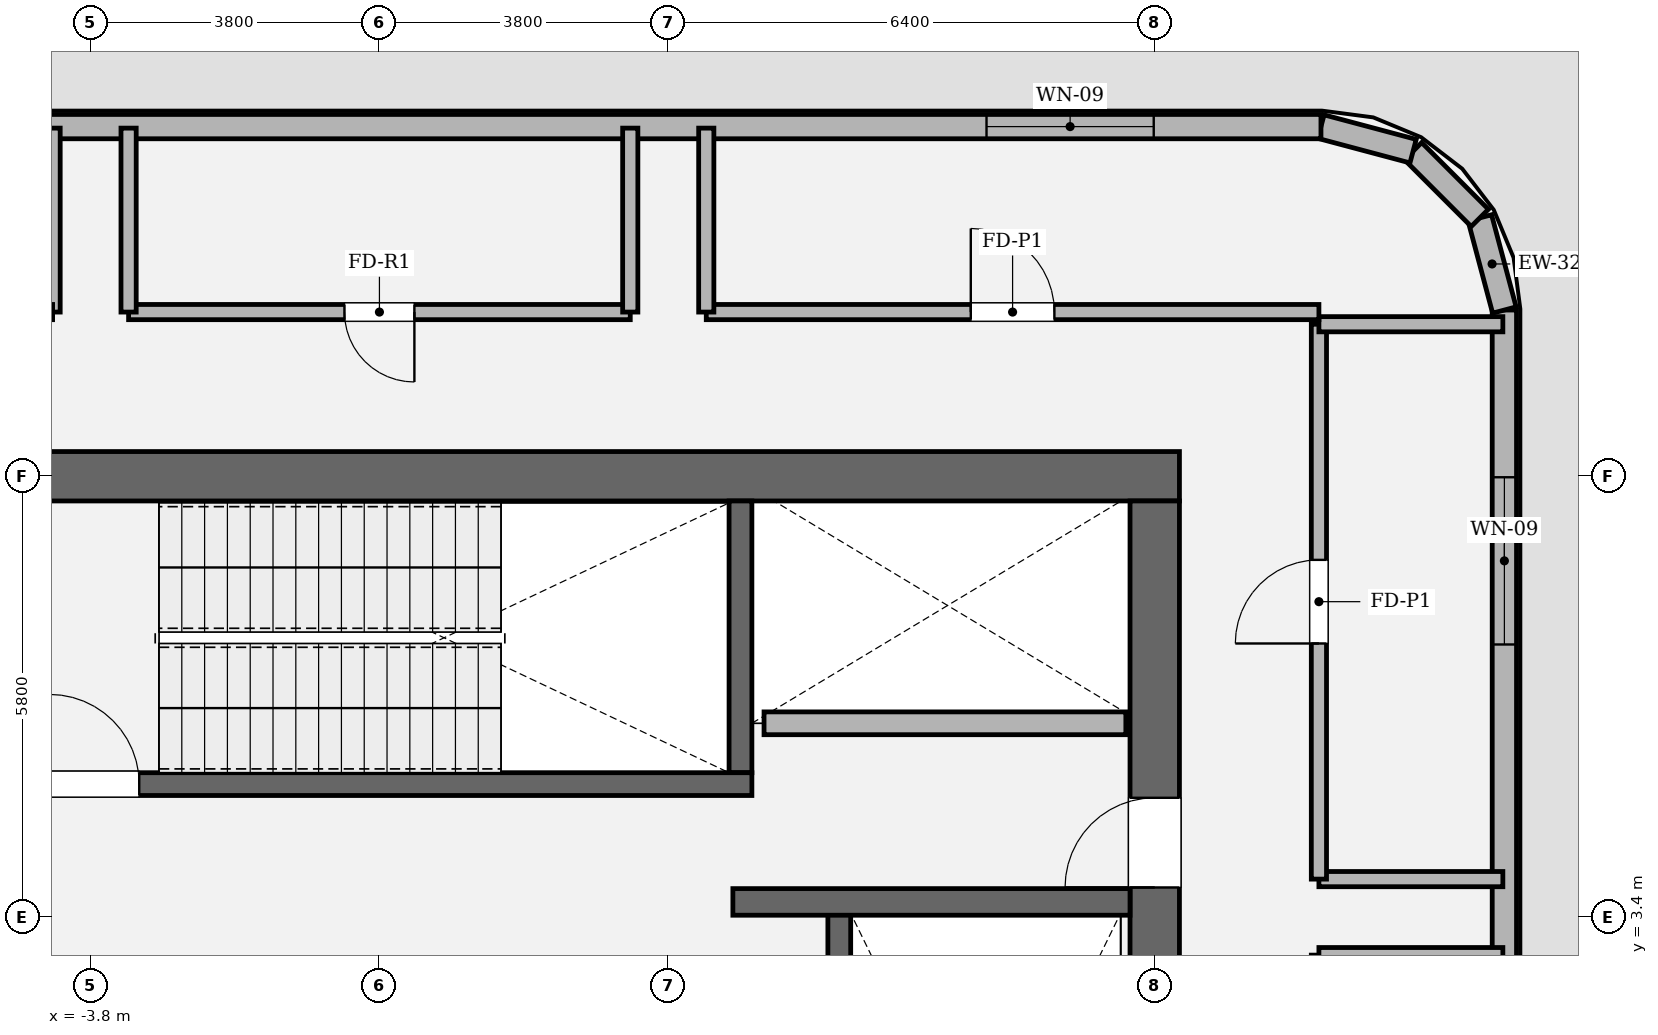
"""IFC4 building model, lengths in metres.
Left out: names, types, materials, properties, quantities, classifications, styles, units other than length and angle.
Written with IfcOpenShell. Run it as: python <this file> out.ifc"""

import sys

from ifc_helpers import new_model, si_unit, direction, frame, frame_2d, origin, place, context, subcontext, project, spatial, rectangle, extrude, element, fill, save


model = new_model("IFC4")
c1 = context("Model", 3, precision=1e-05, world=origin(), true_north=direction((0.0, 1.0)))
c2 = subcontext(c1, "Body", "Model", "MODEL_VIEW")
j1 = project(units=[si_unit("LENGTHUNIT", "METRE"), si_unit("PLANEANGLEUNIT", "RADIAN")], contexts=[c1])
p1 = place(None, origin())
s1 = spatial("IfcSite", under=j1, at=p1, CompositionType="ELEMENT")
p2 = place(p1, origin())
s2 = spatial("IfcBuilding", under=s1, at=p2, CompositionType="ELEMENT")
p3 = place(p2, frame((0.0, 0.0, 125.4)))
s3 = spatial("IfcBuildingStorey", under=s2, at=p3, CompositionType="ELEMENT", Elevation=125.4)
p4 = place(p3, frame((-10.525, 9.2, 0.0), z_axis=(0.0, 0.0, 1.0), x_axis=(1.0, 0.0, 0.0)))
e1 = element("IfcWall", 1, at=p4, inside=s3, PredefinedType="SHEAR", context=c2, shape_type="SweptSolid", body=[
    extrude(rectangle(XDim=21.05, YDim=0.65, at=frame_2d((10.525, 0.0))), origin(), (0.0, 0.0, 1.0), 4.8),
])
p5 = place(p3, frame((10.2, 8.875, 0.0), z_axis=(0.0, 0.0, 1.0), x_axis=(0.0, -1.0, 0.0)))
e2 = element("IfcWall", 2, at=p5, inside=s3, PredefinedType="SHEAR", context=c2, shape_type="SweptSolid", body=[
    extrude(rectangle(XDim=17.75, YDim=0.65, at=frame_2d((8.875, 0.0))), origin(), (0.0, 0.0, 1.0), 4.8),
])
p6 = place(p5, frame((3.905, 0.0, 0.0)))
e3 = element("IfcOpeningElement", 3, at=p6, cuts=e2, PredefinedType="OPENING", context=c2, shape_type="SweptSolid", body=[
    extrude(rectangle(XDim=1.18, YDim=2.2, at=frame_2d((0.59, 1.1))), frame((0.0, 0.335, 0.0), z_axis=(0.0, -1.0, 0.0), x_axis=(1.0, 0.0, 0.0)), (0.0, 0.0, 1.0), 0.67),
])
p7 = place(p3, frame((6.05, 3.45, 0.0), z_axis=(0.0, 0.0, 1.0), x_axis=(0.0, -1.0, 0.0)))
e4 = element("IfcWall", 4, at=p7, inside=s3, PredefinedType="SOLIDWALL", context=c2, shape_type="SweptSolid", body=[
    extrude(rectangle(XDim=8.95, YDim=0.3, at=frame_2d((4.475, 0.0))), origin(), (0.0, 0.0, 1.0), 4.8),
])
p8 = place(p3, frame((4.75, 8.875, 0.0), z_axis=(0.0, 0.0, 1.0), x_axis=(0.0, -1.0, 0.0)))
e5 = element("IfcWall", 5, at=p8, inside=s3, PredefinedType="SOLIDWALL", context=c2, shape_type="SweptSolid", body=[
    extrude(rectangle(XDim=3.575, YDim=0.3, at=frame_2d((1.788, 0.0))), origin(), (0.0, 0.0, 1.0), 4.8),
])
p9 = place(p3, frame((-4.9, 5.15, 0.0), z_axis=(0.0, 0.0, 1.0), x_axis=(1.0, 0.0, 0.0)))
e6 = element("IfcWall", 6, at=p9, inside=s3, PredefinedType="SOLIDWALL", context=c2, shape_type="SweptSolid", body=[
    extrude(rectangle(XDim=9.8, YDim=0.3, at=frame_2d((4.9, 0.0))), origin(), (0.0, 0.0, 1.0), 4.8),
])
p10 = place(p9, frame((0.56, 0.0, 0.0)))
e7 = element("IfcOpeningElement", 7, at=p10, cuts=e6, PredefinedType="OPENING", context=c2, shape_type="SweptSolid", body=[
    extrude(rectangle(XDim=1.18, YDim=2.2, at=frame_2d((0.59, 1.1))), frame((0.0, 0.16, 0.0), z_axis=(0.0, -1.0, 0.0), x_axis=(1.0, 0.0, 0.0)), (0.0, 0.0, 1.0), 0.32),
])
p11 = place(p3, frame((4.65, 3.6, 0.0), z_axis=(0.0, 0.0, 1.0), x_axis=(1.0, 0.0, 0.0)))
e8 = element("IfcWall", 8, at=p11, inside=s3, PredefinedType="SOLIDWALL", context=c2, shape_type="SweptSolid", body=[
    extrude(rectangle(XDim=5.225, YDim=0.35, at=frame_2d((2.613, 0.0))), origin(), (0.0, 0.0, 1.0), 4.8),
])
p12 = place(p3, frame((14.8, -11.387, 0.0), z_axis=(0.0, 0.0, 1.0), x_axis=(0.0, 1.0, 0.0)))
e9 = element("IfcWall", 9, at=p12, inside=s3, PredefinedType="SOLIDWALL", context=c2, shape_type="SweptSolid", body=[
    extrude(rectangle(XDim=22.774, YDim=0.32, at=frame_2d((11.387, 0.0))), origin(), (0.0, 0.0, 1.0), 3.194),
])
p13 = place(p12, frame((2.2, 0.0, 0.9)))
e10 = element("IfcOpeningElement", 10, at=p13, cuts=e9, PredefinedType="OPENING", context=c2, shape_type="SweptSolid", body=[
    extrude(rectangle(XDim=2.2, YDim=1.2, at=frame_2d((1.1, 0.6))), frame((0.0, 0.17, 0.0), z_axis=(0.0, -1.0, 0.0), x_axis=(1.0, 0.0, 0.0)), (0.0, 0.0, 1.0), 0.34),
])
p14 = place(p12, frame((18.374, 0.0, 0.9)))
e11 = element("IfcOpeningElement", 11, at=p14, cuts=e9, PredefinedType="OPENING", context=c2, shape_type="SweptSolid", body=[
    extrude(rectangle(XDim=2.2, YDim=1.2, at=frame_2d((1.1, 0.6))), frame((0.0, 0.17, 0.0), z_axis=(0.0, -1.0, 0.0), x_axis=(1.0, 0.0, 0.0)), (0.0, 0.0, 1.0), 0.34),
])
p15 = place(p3, frame((14.8, 11.387, 0.0), z_axis=(0.0, 0.0, 1.0), x_axis=(-0.25748094776, 0.966283375382, 0.0)))
e12 = element("IfcWall", 12, at=p15, inside=s3, PredefinedType="SOLIDWALL", context=c2, shape_type="SweptSolid", body=[
    extrude(rectangle(XDim=1.254, YDim=0.32, at=frame_2d((0.627, 0.0))), origin(), (0.0, 0.0, 1.0), 3.194),
])
p16 = place(p3, frame((14.477, 12.599, 0.0), z_axis=(0.0, 0.0, 1.0), x_axis=(-0.707106781187, 0.707106781187, 0.0)))
e13 = element("IfcWall", 13, at=p16, inside=s3, PredefinedType="SOLIDWALL", context=c2, shape_type="SweptSolid", body=[
    extrude(rectangle(XDim=1.242, YDim=0.32, at=frame_2d((0.621, 0.0))), origin(), (0.0, 0.0, 1.0), 3.194),
])
p17 = place(p3, frame((13.599, 13.477, 0.0), z_axis=(0.0, 0.0, 1.0), x_axis=(-0.966283375382, 0.25748094776, 0.0)))
e14 = element("IfcWall", 14, at=p17, inside=s3, PredefinedType="SOLIDWALL", context=c2, shape_type="SweptSolid", body=[
    extrude(rectangle(XDim=1.254, YDim=0.32, at=frame_2d((0.627, 0.0))), origin(), (0.0, 0.0, 1.0), 3.194),
])
p18 = place(p3, frame((12.387, 13.8, 0.0), z_axis=(0.0, 0.0, 1.0), x_axis=(-1.0, 0.0, 0.0)))
e15 = element("IfcWall", 15, at=p18, inside=s3, PredefinedType="SOLIDWALL", context=c2, shape_type="SweptSolid", body=[
    extrude(rectangle(XDim=24.774, YDim=0.32, at=frame_2d((12.387, 0.0))), origin(), (0.0, 0.0, 1.0), 3.194),
])
p19 = place(p18, frame((2.2, 0.0, 0.9)))
e16 = element("IfcOpeningElement", 16, at=p19, cuts=e15, PredefinedType="OPENING", context=c2, shape_type="SweptSolid", body=[
    extrude(rectangle(XDim=2.2, YDim=1.2, at=frame_2d((1.1, 0.6))), frame((0.0, 0.17, 0.0), z_axis=(0.0, -1.0, 0.0), x_axis=(1.0, 0.0, 0.0)), (0.0, 0.0, 1.0), 0.34),
])
p20 = place(p18, frame((20.374, 0.0, 0.9)))
e17 = element("IfcOpeningElement", 17, at=p20, cuts=e15, PredefinedType="OPENING", context=c2, shape_type="SweptSolid", body=[
    extrude(rectangle(XDim=2.2, YDim=1.2, at=frame_2d((1.1, 0.6))), frame((0.0, 0.17, 0.0), z_axis=(0.0, -1.0, 0.0), x_axis=(1.0, 0.0, 0.0)), (0.0, 0.0, 1.0), 0.34),
])
p21 = place(p3, frame((5.06, 5.95, 0.0), z_axis=(0.0, 0.0, 1.0), x_axis=(1.0, 0.0, 0.0)))
e18 = element("IfcWall", 18, at=p21, inside=s3, PredefinedType="SOLIDWALL", context=c2, shape_type="SweptSolid", body=[
    extrude(rectangle(XDim=4.76, YDim=0.3, at=frame_2d((2.38, 0.0))), origin(), (0.0, 0.0, 1.0), 4.48),
])
for number, where, z_axis, x_axis in (
    (19, (12.36, 2.9, 0.0), (0.0, 0.0, 1.0), (1.0, 0.0, 0.0)),
    (20, (14.78, 3.9, 0.0), (0.0, 0.0, 1.0), (-1.0, 0.0, 0.0)),
):
    element("IfcWall", number, at=place(p3, frame(where, z_axis=z_axis, x_axis=x_axis)), inside=s3, PredefinedType="SOLIDWALL", context=c2, shape_type="SweptSolid", body=[
        extrude(rectangle(XDim=2.42, YDim=0.2, at=frame_2d((1.21, 0.0))), origin(), (0.0, 0.0, 1.0), 3.194),
    ])
p22 = place(p3, frame((12.36, 3.9, 0.0), z_axis=(0.0, 0.0, 1.0), x_axis=(0.0, 1.0, 0.0)))
e21 = element("IfcWall", 21, at=p22, inside=s3, PredefinedType="SOLIDWALL", context=c2, shape_type="SweptSolid", body=[
    extrude(rectangle(XDim=7.3, YDim=0.2, at=frame_2d((3.65, 0.0))), origin(), (0.0, 0.0, 1.0), 4.48),
])
p23 = place(p22, frame((3.1, 0.0, 0.0)))
e22 = element("IfcOpeningElement", 22, at=p23, cuts=e21, PredefinedType="OPENING", context=c2, shape_type="SweptSolid", body=[
    extrude(rectangle(XDim=1.1, YDim=2.2, at=frame_2d((0.55, 1.1))), frame((0.0, 0.11, 0.0), z_axis=(0.0, -1.0, 0.0), x_axis=(1.0, 0.0, 0.0)), (0.0, 0.0, 1.0), 0.22),
])
for number, where, z_axis, x_axis in (
    (23, (12.36, 11.2, 0.0), (0.0, 0.0, 1.0), (1.0, 0.0, 0.0)),
    (24, (-4.3, 13.78, 0.0), (0.0, 0.0, 1.0), (0.0, -1.0, 0.0)),
):
    element("IfcWall", number, at=place(p3, frame(where, z_axis=z_axis, x_axis=x_axis)), inside=s3, PredefinedType="SOLIDWALL", context=c2, shape_type="SweptSolid", body=[
        extrude(rectangle(XDim=2.42, YDim=0.2, at=frame_2d((1.21, 0.0))), origin(), (0.0, 0.0, 1.0), 3.194),
    ])
p24 = place(p3, frame((3.3, 11.36, 0.0), z_axis=(0.0, 0.0, 1.0), x_axis=(-1.0, 0.0, 0.0)))
e25 = element("IfcWall", 25, at=p24, inside=s3, PredefinedType="SOLIDWALL", context=c2, shape_type="SweptSolid", body=[
    extrude(rectangle(XDim=6.6, YDim=0.2, at=frame_2d((3.3, 0.0))), origin(), (0.0, 0.0, 1.0), 4.48),
])
p25 = place(p24, frame((2.84, 0.0, 0.0)))
e26 = element("IfcOpeningElement", 26, at=p25, cuts=e25, PredefinedType="OPENING", context=c2, shape_type="SweptSolid", body=[
    extrude(rectangle(XDim=0.92, YDim=2.1, at=frame_2d((0.46, 1.05))), frame((0.0, 0.11, 0.0), z_axis=(0.0, -1.0, 0.0), x_axis=(1.0, 0.0, 0.0)), (0.0, 0.0, 1.0), 0.22),
])
for number, where, z_axis, x_axis in (
    (27, (-3.3, 11.36, 0.0), (0.0, 0.0, 1.0), (0.0, 1.0, 0.0)),
    (28, (3.3, 13.78, 0.0), (0.0, 0.0, 1.0), (0.0, -1.0, 0.0)),
):
    element("IfcWall", number, at=place(p3, frame(where, z_axis=z_axis, x_axis=x_axis)), inside=s3, PredefinedType="SOLIDWALL", context=c2, shape_type="SweptSolid", body=[
        extrude(rectangle(XDim=2.42, YDim=0.2, at=frame_2d((1.21, 0.0))), origin(), (0.0, 0.0, 1.0), 3.194),
    ])
p26 = place(p3, frame((12.36, 11.36, 0.0), z_axis=(0.0, 0.0, 1.0), x_axis=(-1.0, 0.0, 0.0)))
e29 = element("IfcWall", 29, at=p26, inside=s3, PredefinedType="SOLIDWALL", context=c2, shape_type="SweptSolid", body=[
    extrude(rectangle(XDim=8.06, YDim=0.2, at=frame_2d((4.03, 0.0))), origin(), (0.0, 0.0, 1.0), 4.48),
])
p27 = place(p26, frame((3.48, 0.0, 0.0)))
e30 = element("IfcOpeningElement", 30, at=p27, cuts=e29, PredefinedType="OPENING", context=c2, shape_type="SweptSolid", body=[
    extrude(rectangle(XDim=1.1, YDim=2.2, at=frame_2d((0.55, 1.1))), frame((0.0, 0.11, 0.0), z_axis=(0.0, -1.0, 0.0), x_axis=(1.0, 0.0, 0.0)), (0.0, 0.0, 1.0), 0.22),
])
p28 = place(p3, frame((4.3, 11.36, 0.0), z_axis=(0.0, 0.0, 1.0), x_axis=(0.0, 1.0, 0.0)))
e31 = element("IfcWall", 31, at=p28, inside=s3, PredefinedType="SOLIDWALL", context=c2, shape_type="SweptSolid", body=[
    extrude(rectangle(XDim=2.42, YDim=0.2, at=frame_2d((1.21, 0.0))), origin(), (0.0, 0.0, 1.0), 3.194),
])
p29 = place(p14, origin())
e32 = element("IfcWindow", 32, at=p29, inside=s3, PartitioningType="SINGLE_PANEL", PredefinedType="WINDOW", context=c2, shape_type="SweptSolid", body=[
    extrude(rectangle(XDim=2.2, YDim=1.2, at=frame_2d((1.1, 0.6))), frame((0.0, 0.03, 0.0), z_axis=(0.0, -1.0, 0.0), x_axis=(1.0, 0.0, 0.0)), (0.0, 0.0, 1.0), 0.06),
])
fill(e11, e32)
p30 = place(p19, origin())
e33 = element("IfcWindow", 33, at=p30, inside=s3, PartitioningType="SINGLE_PANEL", PredefinedType="WINDOW", context=c2, shape_type="SweptSolid", body=[
    extrude(rectangle(XDim=2.2, YDim=1.2, at=frame_2d((1.1, 0.6))), frame((0.0, 0.03, 0.0), z_axis=(0.0, -1.0, 0.0), x_axis=(1.0, 0.0, 0.0)), (0.0, 0.0, 1.0), 0.06),
])
fill(e16, e33)
p31 = place(p10, origin())
e34 = element("IfcDoor", 34, at=p31, inside=s3, OperationType="SINGLE_SWING_LEFT", PredefinedType="DOOR", context=c2, shape_type="SweptSolid", body=[
    extrude(rectangle(XDim=1.18, YDim=2.2, at=frame_2d((0.59, 1.1))), frame((0.0, 0.025, 0.0), z_axis=(0.0, -1.0, 0.0), x_axis=(1.0, 0.0, 0.0)), (0.0, 0.0, 1.0), 0.05),
])
fill(e7, e34)
p32 = place(p6, origin())
e35 = element("IfcDoor", 35, at=p32, inside=s3, OperationType="SINGLE_SWING_RIGHT", PredefinedType="DOOR", context=c2, shape_type="SweptSolid", body=[
    extrude(rectangle(XDim=1.18, YDim=2.2, at=frame_2d((0.59, 1.1))), frame((0.0, 0.025, 0.0), z_axis=(0.0, -1.0, 0.0), x_axis=(1.0, 0.0, 0.0)), (0.0, 0.0, 1.0), 0.05),
])
fill(e3, e35)
p33 = place(p23, origin())
e36 = element("IfcDoor", 36, at=p33, inside=s3, OperationType="SINGLE_SWING_LEFT", PredefinedType="DOOR", context=c2, shape_type="SweptSolid", body=[
    extrude(rectangle(XDim=1.1, YDim=2.2, at=frame_2d((0.55, 1.1))), frame((0.0, 0.025, 0.0), z_axis=(0.0, -1.0, 0.0), x_axis=(1.0, 0.0, 0.0)), (0.0, 0.0, 1.0), 0.05),
])
fill(e22, e36)
p34 = place(p25, origin())
e37 = element("IfcDoor", 37, at=p34, inside=s3, OperationType="SINGLE_SWING_LEFT", PredefinedType="DOOR", context=c2, shape_type="SweptSolid", body=[
    extrude(rectangle(XDim=0.92, YDim=2.1, at=frame_2d((0.46, 1.05))), frame((0.0, 0.025, 0.0), z_axis=(0.0, -1.0, 0.0), x_axis=(1.0, 0.0, 0.0)), (0.0, 0.0, 1.0), 0.05),
])
fill(e26, e37)
p35 = place(p27, origin())
e38 = element("IfcDoor", 38, at=p35, inside=s3, OperationType="SINGLE_SWING_RIGHT", PredefinedType="DOOR", context=c2, shape_type="SweptSolid", body=[
    extrude(rectangle(XDim=1.1, YDim=2.2, at=frame_2d((0.55, 1.1))), frame((0.0, 0.025, 0.0), z_axis=(0.0, -1.0, 0.0), x_axis=(1.0, 0.0, 0.0)), (0.0, 0.0, 1.0), 0.05),
])
fill(e30, e38)
save(model, sys.argv[1])
